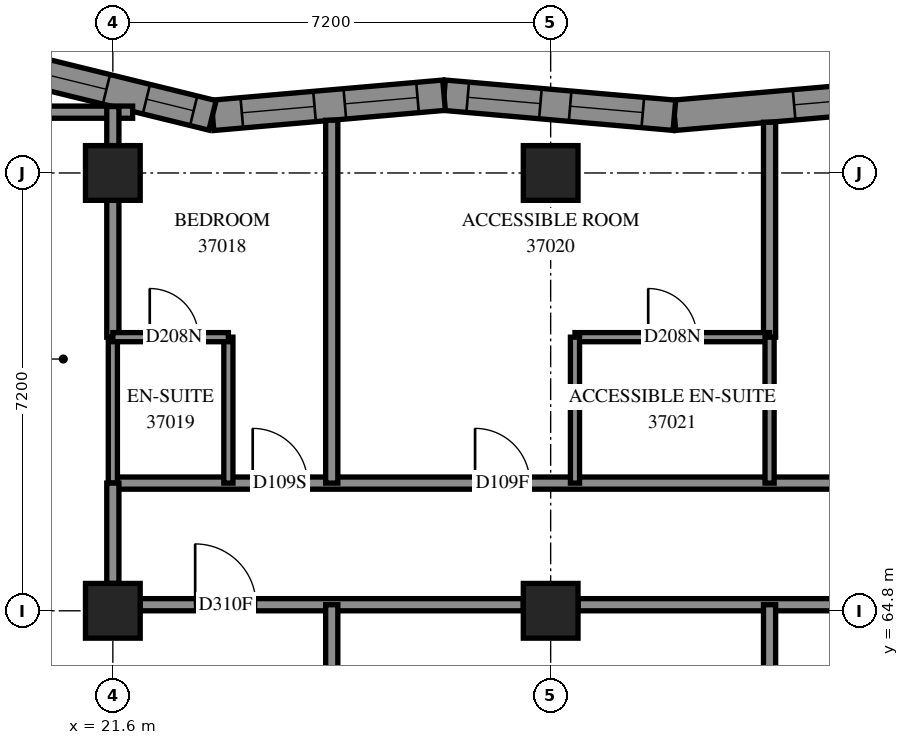
"""IFC4 building model, lengths in metres.
Left out: names, types, materials, properties, quantities, classifications, styles, units other than length and angle.
Written with IfcOpenShell. Run it as: python <this file> out.ifc"""

import sys

from ifc_helpers import new_model, si_unit, direction, frame, frame_2d, origin, origin_2d, place, context, subcontext, project, spatial, polyline, rectangle, outline, extrude, element, fill, save


model = new_model("IFC4")
c1 = context("Model", 3, precision=1e-05, world=origin(), true_north=direction((0.0, 1.0)))
c2 = subcontext(c1, "Body", "Model", "MODEL_VIEW")
j1 = project(units=[si_unit("LENGTHUNIT", "METRE"), si_unit("PLANEANGLEUNIT", "RADIAN")], contexts=[c1])
p1 = place(None, origin())
s1 = spatial("IfcSite", under=j1, at=p1, CompositionType="ELEMENT")
p2 = place(p1, origin())
s2 = spatial("IfcBuilding", under=s1, at=p2, CompositionType="ELEMENT")
p3 = place(p2, frame((0.0, 0.0, 138.8)))
s3 = spatial("IfcBuildingStorey", under=s2, at=p3, CompositionType="ELEMENT", Elevation=138.8)
for number, where, z_axis, x_axis in (
    (1, (21.6, 64.8, 0.0), (0.0, 0.0, 1.0), (1.0, 0.0, 0.0)),
    (2, (21.6, 72.0, 0.0), (0.0, 0.0, 1.0), (1.0, 0.0, 0.0)),
    (3, (28.8, 64.8, 0.0), (0.0, 0.0, 1.0), (1.0, 0.0, 0.0)),
    (4, (28.8, 72.0, 0.0), (0.0, 0.0, 1.0), (1.0, 0.0, 0.0)),
):
    element("IfcColumn", number, at=place(p3, frame(where, z_axis=z_axis, x_axis=x_axis)), inside=s3, PredefinedType="COLUMN", context=c2, shape_type="SweptSolid", body=[
        extrude(rectangle(XDim=0.9, YDim=0.9, at=origin_2d()), origin(), (0.0, 0.0, 1.0), 3.1),
    ])
p4 = place(p3, frame((34.623, 73.279, 0.0), z_axis=(0.0, 0.0, 1.0), x_axis=(-0.9962273538, -0.0867816769, 0.0)))
e5 = element("IfcWall", 5, at=p4, inside=s3, PredefinedType="SOLIDWALL", context=c2, shape_type="SweptSolid", body=[
    extrude(outline(polyline([(-0.022, -0.25), (3.781, -0.25), (3.824, 0.25), (0.022, 0.25), (-0.022, -0.25)])), origin(), (0.0, 0.0, 1.0), 3.1),
])
p5 = place(p4, frame((0.627, 0.0, 0.45)))
e6 = element("IfcOpeningElement", 6, at=p5, cuts=e5, PredefinedType="OPENING", context=c2, shape_type="SweptSolid", body=[
    extrude(rectangle(XDim=1.2, YDim=2.5, at=frame_2d((0.6, 1.25))), frame((0.0, 0.26, 0.0), z_axis=(0.0, -1.0, 0.0), x_axis=(1.0, 0.0, 0.0)), (0.0, 0.0, 1.0), 0.52),
])
p6 = place(p3, frame((30.835, 72.949, 0.0), z_axis=(0.0, 0.0, 1.0), x_axis=(-0.9962273538, 0.0867816769, 0.0)))
e7 = element("IfcWall", 7, at=p6, inside=s3, PredefinedType="SOLIDWALL", context=c2, shape_type="SweptSolid", body=[
    extrude(outline(polyline([(0.022, -0.25), (3.824, -0.25), (3.781, 0.25), (-0.022, 0.25), (0.022, -0.25)])), origin(), (0.0, 0.0, 1.0), 3.1),
])
p7 = place(p6, frame((0.521, 0.0, 0.45)))
e8 = element("IfcOpeningElement", 8, at=p7, cuts=e7, PredefinedType="OPENING", context=c2, shape_type="SweptSolid", body=[
    extrude(rectangle(XDim=1.2, YDim=2.5, at=frame_2d((0.6, 1.25))), frame((0.0, 0.26, 0.0), z_axis=(0.0, -1.0, 0.0), x_axis=(1.0, 0.0, 0.0)), (0.0, 0.0, 1.0), 0.52),
])
p8 = place(p6, frame((2.212, 0.0, 0.45)))
e9 = element("IfcOpeningElement", 9, at=p8, cuts=e7, PredefinedType="OPENING", context=c2, shape_type="SweptSolid", body=[
    extrude(rectangle(XDim=1.2, YDim=2.5, at=frame_2d((0.6, 1.25))), frame((0.0, 0.26, 0.0), z_axis=(0.0, -1.0, 0.0), x_axis=(1.0, 0.0, 0.0)), (0.0, 0.0, 1.0), 0.52),
])
p9 = place(p3, frame((27.047, 73.279, 0.0), z_axis=(0.0, 0.0, 1.0), x_axis=(-0.9962271263, -0.0867842891, 0.0)))
e10 = element("IfcWall", 10, at=p9, inside=s3, PredefinedType="SOLIDWALL", context=c2, shape_type="SweptSolid", body=[
    extrude(outline(polyline([(-0.022, -0.25), (3.781, -0.25), (3.864, 0.25), (0.022, 0.25), (-0.022, -0.25)])), origin(), (0.0, 0.0, 1.0), 3.1),
])
p10 = place(p9, frame((0.438, 0.0, 0.45)))
e11 = element("IfcOpeningElement", 11, at=p10, cuts=e10, PredefinedType="OPENING", context=c2, shape_type="SweptSolid", body=[
    extrude(rectangle(XDim=1.2, YDim=2.5, at=frame_2d((0.6, 1.25))), frame((0.0, 0.26, 0.0), z_axis=(0.0, -1.0, 0.0), x_axis=(1.0, 0.0, 0.0)), (0.0, 0.0, 1.0), 0.52),
])
p11 = place(p9, frame((2.138, 0.0, 0.45)))
e12 = element("IfcOpeningElement", 12, at=p11, cuts=e10, PredefinedType="OPENING", context=c2, shape_type="SweptSolid", body=[
    extrude(rectangle(XDim=1.2, YDim=2.5, at=frame_2d((0.6, 1.25))), frame((0.0, 0.26, 0.0), z_axis=(0.0, -1.0, 0.0), x_axis=(1.0, 0.0, 0.0)), (0.0, 0.0, 1.0), 0.52),
])
p12 = place(p3, frame((23.239, 72.947, 0.0), z_axis=(0.0, 0.0, 1.0), x_axis=(-0.9711662492, 0.2384032642, 0.0)))
e13 = element("IfcWall", 13, at=p12, inside=s3, PredefinedType="SOLIDWALL", context=c2, shape_type="SweptSolid", body=[
    extrude(outline(polyline([(0.041, -0.25), (3.942, -0.25), (3.304, 0.25), (-0.041, 0.25), (0.041, -0.25)])), origin(), (0.0, 0.0, 1.0), 3.1),
])
p13 = place(p12, frame((1.796, 0.0, 0.45)))
e14 = element("IfcOpeningElement", 14, at=p13, cuts=e13, PredefinedType="OPENING", context=c2, shape_type="SweptSolid", body=[
    extrude(rectangle(XDim=1.2, YDim=2.5, at=frame_2d((0.6, 1.25))), frame((0.0, 0.26, 0.0), z_axis=(0.0, -1.0, 0.0), x_axis=(1.0, 0.0, 0.0)), (0.0, 0.0, 1.0), 0.52),
])
p14 = place(p12, frame((0.319, 0.0, 0.45)))
e15 = element("IfcOpeningElement", 15, at=p14, cuts=e13, PredefinedType="OPENING", context=c2, shape_type="SweptSolid", body=[
    extrude(rectangle(XDim=0.8, YDim=2.5, at=frame_2d((0.4, 1.25))), frame((0.0, 0.26, 0.0), z_axis=(0.0, -1.0, 0.0), x_axis=(1.0, 0.0, 0.0)), (0.0, 0.0, 1.0), 0.52),
])
p15 = place(p3, frame((21.6, 66.9, 0.0), z_axis=(0.0, 0.0, 1.0), x_axis=(1.0, 0.0, 0.0)))
e16 = element("IfcWall", 16, at=p15, inside=s3, PredefinedType="PARTITIONING", context=c2, shape_type="SweptSolid", body=[
    extrude(rectangle(XDim=19.0, YDim=0.2, at=frame_2d((9.5, 0.0))), origin(), (0.0, 0.0, 1.0), 3.1),
])
p16 = place(p15, frame((2.3, 0.0, 0.0)))
e17 = element("IfcOpeningElement", 17, at=p16, cuts=e16, PredefinedType="OPENING", context=c2, shape_type="SweptSolid", body=[
    extrude(rectangle(XDim=0.9, YDim=2.1, at=frame_2d((0.45, 1.05))), frame((0.0, 0.11, 0.0), z_axis=(0.0, -1.0, 0.0), x_axis=(1.0, 0.0, 0.0)), (0.0, 0.0, 1.0), 0.22),
])
p17 = place(p15, frame((5.957, 0.0, 0.0)))
e18 = element("IfcOpeningElement", 18, at=p17, cuts=e16, PredefinedType="OPENING", context=c2, shape_type="SweptSolid", body=[
    extrude(rectangle(XDim=0.9, YDim=2.1, at=frame_2d((0.45, 1.05))), frame((0.0, 0.11, 0.0), z_axis=(0.0, -1.0, 0.0), x_axis=(1.0, 0.0, 0.0)), (0.0, 0.0, 1.0), 0.22),
])
p18 = place(p15, frame((13.057, 0.0, 0.0)))
e19 = element("IfcOpeningElement", 19, at=p18, cuts=e16, PredefinedType="OPENING", context=c2, shape_type="SweptSolid", body=[
    extrude(rectangle(XDim=0.9, YDim=2.1, at=frame_2d((0.45, 1.05))), frame((0.0, 0.11, 0.0), z_axis=(0.0, -1.0, 0.0), x_axis=(1.0, 0.0, 0.0)), (0.0, 0.0, 1.0), 0.22),
])
p19 = place(p3, frame((22.05, 64.9, 0.0), z_axis=(0.0, 0.0, 1.0), x_axis=(1.0, 0.0, 0.0)))
e20 = element("IfcWall", 20, at=p19, inside=s3, PredefinedType="PARTITIONING", context=c2, shape_type="SweptSolid", body=[
    extrude(rectangle(XDim=6.3, YDim=0.2, at=frame_2d((3.15, 0.0))), origin(), (0.0, 0.0, 1.0), 2.6),
])
p20 = place(p19, frame((0.904, 0.0, 0.0)))
e21 = element("IfcOpeningElement", 21, at=p20, cuts=e20, PredefinedType="OPENING", context=c2, shape_type="SweptSolid", body=[
    extrude(rectangle(XDim=1.0, YDim=2.1, at=frame_2d((0.5, 1.05))), frame((0.0, 0.11, 0.0), z_axis=(0.0, -1.0, 0.0), x_axis=(1.0, 0.0, 0.0)), (0.0, 0.0, 1.0), 0.22),
])
p21 = place(p3, frame((29.25, 64.9, 0.0), z_axis=(0.0, 0.0, 1.0), x_axis=(1.0, 0.0, 0.0)))
e22 = element("IfcWall", 22, at=p21, inside=s3, PredefinedType="PARTITIONING", context=c2, shape_type="SweptSolid", body=[
    extrude(rectangle(XDim=6.3, YDim=0.2, at=frame_2d((3.15, 0.0))), origin(), (0.0, 0.0, 1.0), 2.6),
])
p22 = place(p21, frame((4.86, 0.0, 0.0)))
e23 = element("IfcOpeningElement", 23, at=p22, cuts=e22, PredefinedType="OPENING", context=c2, shape_type="SweptSolid", body=[
    extrude(rectangle(XDim=1.0, YDim=2.1, at=frame_2d((0.5, 1.05))), frame((0.0, 0.11, 0.0), z_axis=(0.0, -1.0, 0.0), x_axis=(1.0, 0.0, 0.0)), (0.0, 0.0, 1.0), 0.22),
])
p23 = place(p3, frame((25.2, 66.9, 0.0), z_axis=(0.0, 0.0, 1.0), x_axis=(0.0, 1.0, 0.0)))
e24 = element("IfcWall", 24, at=p23, inside=s3, PredefinedType="PARTITIONING", context=c2, shape_type="SweptSolid", body=[
    extrude(rectangle(XDim=5.967, YDim=0.2, at=frame_2d((2.984, 0.0))), origin(), (0.0, 0.0, 1.0), 3.1),
])
p24 = place(p3, frame((32.4, 69.3, 0.0), z_axis=(0.0, 0.0, 1.0), x_axis=(0.0, 1.0, 0.0)))
e25 = element("IfcWall", 25, at=p24, inside=s3, PredefinedType="PARTITIONING", context=c2, shape_type="SweptSolid", body=[
    extrude(rectangle(XDim=3.534, YDim=0.2, at=frame_2d((1.767, 0.0))), origin(), (0.0, 0.0, 1.0), 3.1),
])
p25 = place(p3, frame((29.2, 69.3, 0.0), z_axis=(0.0, 0.0, 1.0), x_axis=(1.0, 0.0, 0.0)))
e26 = element("IfcWall", 26, at=p25, inside=s3, PredefinedType="PARTITIONING", context=c2, shape_type="SweptSolid", body=[
    extrude(rectangle(XDim=3.2, YDim=0.15, at=frame_2d((1.6, 0.0))), origin(), (0.0, 0.0, 1.0), 3.1),
])
p26 = place(p25, frame((1.204, 0.0, 0.0)))
e27 = element("IfcOpeningElement", 27, at=p26, cuts=e26, PredefinedType="OPENING", context=c2, shape_type="SweptSolid", body=[
    extrude(rectangle(XDim=0.8, YDim=2.1, at=frame_2d((0.4, 1.05))), frame((0.0, 0.085, 0.0), z_axis=(0.0, -1.0, 0.0), x_axis=(1.0, 0.0, 0.0)), (0.0, 0.0, 1.0), 0.17),
])
p27 = place(p3, frame((21.6, 66.9, 0.0), z_axis=(0.0, 0.0, 1.0), x_axis=(0.0, 1.0, 0.0)))
e28 = element("IfcWall", 28, at=p27, inside=s3, PredefinedType="PARTITIONING", context=c2, shape_type="SweptSolid", body=[
    extrude(rectangle(XDim=2.4, YDim=0.15, at=frame_2d((1.2, 0.0))), origin(), (0.0, 0.0, 1.0), 2.6),
])
for number, where, z_axis, x_axis in (
    (29, (23.5, 66.9, 0.0), (0.0, 0.0, 1.0), (0.0, 1.0, 0.0)),
    (30, (29.2, 66.9, 0.0), (0.0, 0.0, 1.0), (0.0, 1.0, 0.0)),
    (31, (32.4, 66.9, 0.0), (0.0, 0.0, 1.0), (0.0, 1.0, 0.0)),
):
    element("IfcWall", number, at=place(p3, frame(where, z_axis=z_axis, x_axis=x_axis)), inside=s3, PredefinedType="PARTITIONING", context=c2, shape_type="SweptSolid", body=[
        extrude(rectangle(XDim=2.4, YDim=0.15, at=frame_2d((1.2, 0.0))), origin(), (0.0, 0.0, 1.0), 3.1),
    ])
p28 = place(p3, frame((21.6, 69.3, 0.0), z_axis=(0.0, 0.0, 1.0), x_axis=(0.0, 1.0, 0.0)))
e32 = element("IfcWall", 32, at=p28, inside=s3, PredefinedType="PARTITIONING", context=c2, shape_type="SweptSolid", body=[
    extrude(rectangle(XDim=2.25, YDim=0.2, at=frame_2d((1.125, 0.0))), origin(), (0.0, 0.0, 1.0), 2.6),
])
p29 = place(p3, frame((19.97, 73.0, 0.0), z_axis=(0.0, 0.0, 1.0), x_axis=(1.0, 0.0, 0.0)))
e33 = element("IfcWall", 33, at=p29, inside=s3, PredefinedType="PARTITIONING", context=c2, shape_type="SweptSolid", body=[
    extrude(rectangle(XDim=1.956, YDim=0.2, at=frame_2d((0.978, 0.0))), origin(), (0.0, 0.0, 1.0), 3.1),
])
p30 = place(p3, frame((21.6, 69.3, 0.0), z_axis=(0.0, 0.0, 1.0), x_axis=(1.0, 0.0, 0.0)))
e34 = element("IfcWall", 34, at=p30, inside=s3, PredefinedType="PARTITIONING", context=c2, shape_type="SweptSolid", body=[
    extrude(rectangle(XDim=1.9, YDim=0.15, at=frame_2d((0.95, 0.0))), origin(), (0.0, 0.0, 1.0), 3.1),
])
p31 = place(p30, frame((0.607, 0.0, 0.0)))
e35 = element("IfcOpeningElement", 35, at=p31, cuts=e34, PredefinedType="OPENING", context=c2, shape_type="SweptSolid", body=[
    extrude(rectangle(XDim=0.8, YDim=2.1, at=frame_2d((0.4, 1.05))), frame((0.0, 0.085, 0.0), z_axis=(0.0, -1.0, 0.0), x_axis=(1.0, 0.0, 0.0)), (0.0, 0.0, 1.0), 0.17),
])
for number, where, z_axis, x_axis in (
    (36, (25.2, 63.17, 0.0), (0.0, 0.0, 1.0), (0.0, 1.0, 0.0)),
    (37, (32.4, 63.17, 0.0), (0.0, 0.0, 1.0), (0.0, 1.0, 0.0)),
):
    element("IfcWall", number, at=place(p3, frame(where, z_axis=z_axis, x_axis=x_axis)), inside=s3, PredefinedType="PARTITIONING", context=c2, shape_type="SweptSolid", body=[
        extrude(rectangle(XDim=1.73, YDim=0.2, at=frame_2d((0.865, 0.0))), origin(), (0.0, 0.0, 1.0), 3.1),
    ])
p32 = place(p3, frame((21.6, 65.25, 0.0), z_axis=(0.0, 0.0, 1.0), x_axis=(0.0, 1.0, 0.0)))
e38 = element("IfcWall", 38, at=p32, inside=s3, PredefinedType="PARTITIONING", context=c2, shape_type="SweptSolid", body=[
    extrude(rectangle(XDim=1.65, YDim=0.2, at=frame_2d((0.825, 0.0))), origin(), (0.0, 0.0, 1.0), 2.6),
])
p33 = place(p3, frame((21.6, 72.45, 0.0), z_axis=(0.0, 0.0, 1.0), x_axis=(0.0, 1.0, 0.0)))
e39 = element("IfcWall", 39, at=p33, inside=s3, PredefinedType="PARTITIONING", context=c2, shape_type="SweptSolid", body=[
    extrude(rectangle(XDim=0.642, YDim=0.2, at=frame_2d((0.321, 0.0))), origin(), (0.0, 0.0, 1.0), 3.1),
])
p34 = place(p5, origin())
e40 = element("IfcWindow", 40, at=p34, inside=s3, PartitioningType="SINGLE_PANEL", PredefinedType="WINDOW", context=c2, shape_type="SweptSolid", body=[
    extrude(rectangle(XDim=1.2, YDim=2.5, at=frame_2d((0.6, 1.25))), frame((0.0, 0.18, 0.0), z_axis=(0.0, -1.0, 0.0), x_axis=(1.0, 0.0, 0.0)), (0.0, 0.0, 1.0), 0.06),
])
fill(e6, e40)
p35 = place(p7, origin())
e41 = element("IfcWindow", 41, at=p35, inside=s3, PartitioningType="SINGLE_PANEL", PredefinedType="WINDOW", context=c2, shape_type="SweptSolid", body=[
    extrude(rectangle(XDim=1.2, YDim=2.5, at=frame_2d((0.6, 1.25))), frame((0.0, 0.18, 0.0), z_axis=(0.0, -1.0, 0.0), x_axis=(1.0, 0.0, 0.0)), (0.0, 0.0, 1.0), 0.06),
])
fill(e8, e41)
p36 = place(p8, origin())
e42 = element("IfcWindow", 42, at=p36, inside=s3, PartitioningType="SINGLE_PANEL", PredefinedType="WINDOW", context=c2, shape_type="SweptSolid", body=[
    extrude(rectangle(XDim=1.2, YDim=2.5, at=frame_2d((0.6, 1.25))), frame((0.0, 0.18, 0.0), z_axis=(0.0, -1.0, 0.0), x_axis=(1.0, 0.0, 0.0)), (0.0, 0.0, 1.0), 0.06),
])
fill(e9, e42)
p37 = place(p10, origin())
e43 = element("IfcWindow", 43, at=p37, inside=s3, PartitioningType="SINGLE_PANEL", PredefinedType="WINDOW", context=c2, shape_type="SweptSolid", body=[
    extrude(rectangle(XDim=1.2, YDim=2.5, at=frame_2d((0.6, 1.25))), frame((0.0, 0.18, 0.0), z_axis=(0.0, -1.0, 0.0), x_axis=(1.0, 0.0, 0.0)), (0.0, 0.0, 1.0), 0.06),
])
fill(e11, e43)
p38 = place(p11, origin())
e44 = element("IfcWindow", 44, at=p38, inside=s3, PartitioningType="SINGLE_PANEL", PredefinedType="WINDOW", context=c2, shape_type="SweptSolid", body=[
    extrude(rectangle(XDim=1.2, YDim=2.5, at=frame_2d((0.6, 1.25))), frame((0.0, 0.18, 0.0), z_axis=(0.0, -1.0, 0.0), x_axis=(1.0, 0.0, 0.0)), (0.0, 0.0, 1.0), 0.06),
])
fill(e12, e44)
p39 = place(p13, origin())
e45 = element("IfcWindow", 45, at=p39, inside=s3, PartitioningType="SINGLE_PANEL", PredefinedType="WINDOW", context=c2, shape_type="SweptSolid", body=[
    extrude(rectangle(XDim=1.2, YDim=2.5, at=frame_2d((0.6, 1.25))), frame((0.0, 0.18, 0.0), z_axis=(0.0, -1.0, 0.0), x_axis=(1.0, 0.0, 0.0)), (0.0, 0.0, 1.0), 0.06),
])
fill(e14, e45)
p40 = place(p20, origin())
e46 = element("IfcDoor", 46, at=p40, inside=s3, OperationType="SINGLE_SWING_RIGHT", PredefinedType="DOOR", context=c2, shape_type="SweptSolid", body=[
    extrude(rectangle(XDim=1.0, YDim=2.1, at=frame_2d((0.5, 1.05))), frame((0.0, 0.025, 0.0), z_axis=(0.0, -1.0, 0.0), x_axis=(1.0, 0.0, 0.0)), (0.0, 0.0, 1.0), 0.05),
])
fill(e21, e46)
p41 = place(p16, origin())
e47 = element("IfcDoor", 47, at=p41, inside=s3, OperationType="SINGLE_SWING_RIGHT", PredefinedType="DOOR", context=c2, shape_type="SweptSolid", body=[
    extrude(rectangle(XDim=0.9, YDim=2.1, at=frame_2d((0.45, 1.05))), frame((0.0, 0.025, 0.0), z_axis=(0.0, -1.0, 0.0), x_axis=(1.0, 0.0, 0.0)), (0.0, 0.0, 1.0), 0.05),
])
fill(e17, e47)
p42 = place(p31, origin())
e48 = element("IfcDoor", 48, at=p42, inside=s3, OperationType="SINGLE_SWING_RIGHT", PredefinedType="DOOR", context=c2, shape_type="SweptSolid", body=[
    extrude(rectangle(XDim=0.8, YDim=2.1, at=frame_2d((0.4, 1.05))), frame((0.0, 0.025, 0.0), z_axis=(0.0, -1.0, 0.0), x_axis=(1.0, 0.0, 0.0)), (0.0, 0.0, 1.0), 0.05),
])
fill(e35, e48)
p43 = place(p17, origin())
e49 = element("IfcDoor", 49, at=p43, inside=s3, OperationType="SINGLE_SWING_LEFT", PredefinedType="DOOR", context=c2, shape_type="SweptSolid", body=[
    extrude(rectangle(XDim=0.9, YDim=2.1, at=frame_2d((0.45, 1.05))), frame((0.0, 0.025, 0.0), z_axis=(0.0, -1.0, 0.0), x_axis=(1.0, 0.0, 0.0)), (0.0, 0.0, 1.0), 0.05),
])
fill(e18, e49)
p44 = place(p26, origin())
e50 = element("IfcDoor", 50, at=p44, inside=s3, OperationType="SINGLE_SWING_RIGHT", PredefinedType="DOOR", context=c2, shape_type="SweptSolid", body=[
    extrude(rectangle(XDim=0.8, YDim=2.1, at=frame_2d((0.4, 1.05))), frame((0.0, 0.025, 0.0), z_axis=(0.0, -1.0, 0.0), x_axis=(1.0, 0.0, 0.0)), (0.0, 0.0, 1.0), 0.05),
])
fill(e27, e50)
p45 = place(p14, origin())
e51 = element("IfcWindow", 51, at=p45, inside=s3, PartitioningType="SINGLE_PANEL", PredefinedType="WINDOW", context=c2, shape_type="SweptSolid", body=[
    extrude(rectangle(XDim=0.8, YDim=2.5, at=frame_2d((0.4, 1.25))), frame((0.0, 0.18, 0.0), z_axis=(0.0, -1.0, 0.0), x_axis=(1.0, 0.0, 0.0)), (0.0, 0.0, 1.0), 0.06),
])
fill(e15, e51)
save(model, sys.argv[1])
